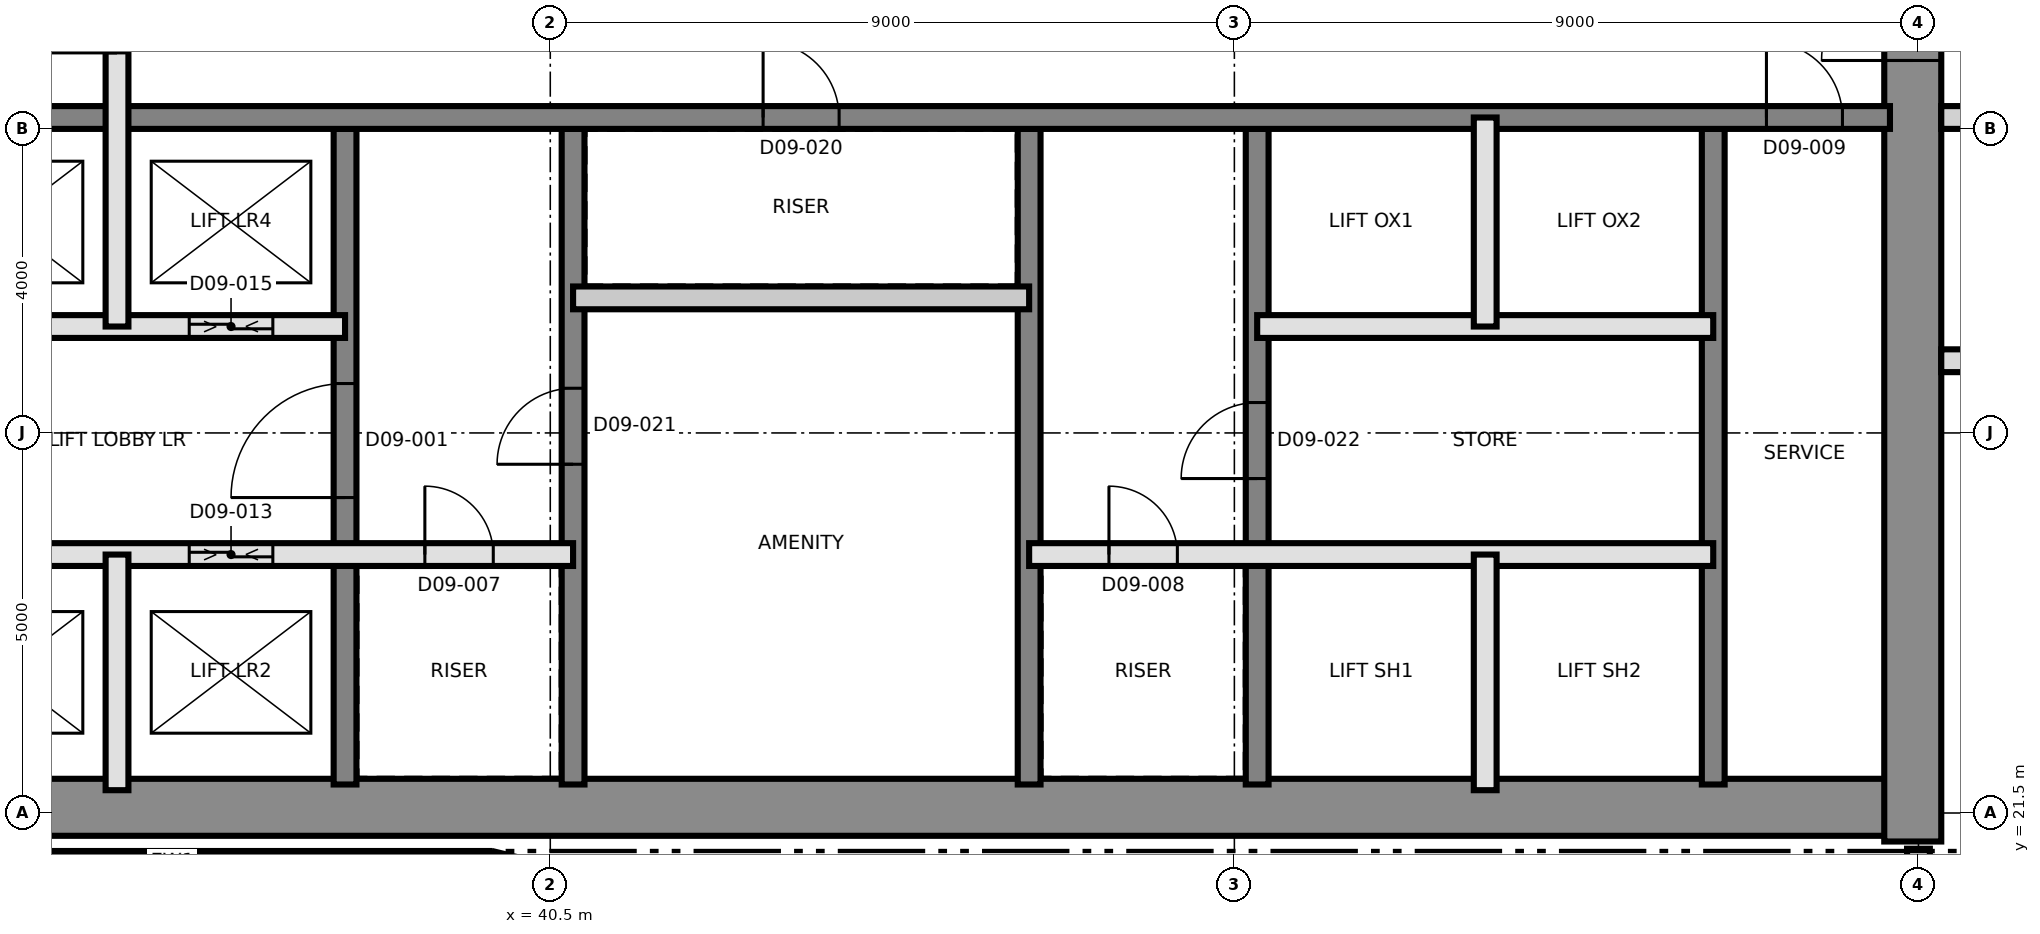
"""IFC4 building model, lengths in metres.
Left out: names, types, materials, properties, quantities, classifications, styles, units other than length and angle.
Written with IfcOpenShell. Run it as: python <this file> out.ifc"""

import sys

from ifc_helpers import new_model, si_unit, direction, frame, frame_2d, origin, place, context, subcontext, project, spatial, rectangle, extrude, element, fill, save


model = new_model("IFC4")
c1 = context("Model", 3, precision=1e-05, world=origin(), true_north=direction((0.0, 1.0)))
c2 = subcontext(c1, "Body", "Model", "MODEL_VIEW")
j1 = project(units=[si_unit("LENGTHUNIT", "METRE"), si_unit("PLANEANGLEUNIT", "RADIAN")], contexts=[c1])
p1 = place(None, origin())
s1 = spatial("IfcSite", under=j1, at=p1, CompositionType="ELEMENT")
p2 = place(p1, origin())
s2 = spatial("IfcBuilding", under=s1, at=p2, CompositionType="ELEMENT")
p3 = place(p2, frame((0.0, 0.0, 109.3)))
s3 = spatial("IfcBuildingStorey", under=s2, at=p3, CompositionType="ELEMENT", Elevation=109.3)
p4 = place(p3, frame((31.125, 21.575, 0.0), z_axis=(0.0, 0.0, 1.0), x_axis=(1.0, 0.0, 0.0)))
e1 = element("IfcWall", 1, at=p4, inside=s3, PredefinedType="SHEAR", context=c2, shape_type="SweptSolid", body=[
    extrude(rectangle(XDim=27.0, YDim=0.75, at=frame_2d((13.5, 0.0))), origin(), (0.0, 0.0, 1.0), 3.7),
])
p5 = place(p3, frame((58.425, 21.125, 0.0), z_axis=(0.0, 0.0, 1.0), x_axis=(0.0, 1.0, 0.0)))
e2 = element("IfcWall", 2, at=p5, inside=s3, PredefinedType="SHEAR", context=c2, shape_type="SweptSolid", body=[
    extrude(rectangle(XDim=18.75, YDim=0.75, at=frame_2d((9.375, 0.0))), origin(), (0.0, 0.0, 1.0), 3.7),
])
p6 = place(p5, frame((10.275, 0.0, 0.0)))
e3 = element("IfcOpeningElement", 3, at=p6, cuts=e2, PredefinedType="OPENING", context=c2, shape_type="SweptSolid", body=[
    extrude(rectangle(XDim=1.2, YDim=2.1, at=frame_2d((0.6, 1.05))), frame((0.0, 0.385, 0.0), z_axis=(0.0, -1.0, 0.0), x_axis=(1.0, 0.0, 0.0)), (0.0, 0.0, 1.0), 0.77),
])
p7 = place(p3, frame((37.8, 21.875, 0.0), z_axis=(0.0, 0.0, 1.0), x_axis=(0.0, 1.0, 0.0)))
e4 = element("IfcWall", 4, at=p7, inside=s3, PredefinedType="SHEAR", context=c2, shape_type="SweptSolid", body=[
    extrude(rectangle(XDim=8.625, YDim=0.3, at=frame_2d((4.312, 0.0))), origin(), (0.0, 0.0, 1.0), 3.7),
])
p8 = place(p7, frame((3.775, 0.0, 0.0)))
e5 = element("IfcOpeningElement", 5, at=p8, cuts=e4, PredefinedType="OPENING", context=c2, shape_type="SweptSolid", body=[
    extrude(rectangle(XDim=1.5, YDim=2.1, at=frame_2d((0.75, 1.05))), frame((0.0, 0.16, 0.0), z_axis=(0.0, -1.0, 0.0), x_axis=(1.0, 0.0, 0.0)), (0.0, 0.0, 1.0), 0.32),
])
p9 = place(p3, frame((40.8, 21.875, 0.0), z_axis=(0.0, 0.0, 1.0), x_axis=(0.0, 1.0, 0.0)))
e6 = element("IfcWall", 6, at=p9, inside=s3, PredefinedType="SHEAR", context=c2, shape_type="SweptSolid", body=[
    extrude(rectangle(XDim=8.625, YDim=0.3, at=frame_2d((4.312, 0.0))), origin(), (0.0, 0.0, 1.0), 3.7),
])
p10 = place(p9, frame((4.213, 0.0, 0.0)))
e7 = element("IfcOpeningElement", 7, at=p10, cuts=e6, PredefinedType="OPENING", context=c2, shape_type="SweptSolid", body=[
    extrude(rectangle(XDim=1.0, YDim=2.1, at=frame_2d((0.5, 1.05))), frame((0.0, 0.16, 0.0), z_axis=(0.0, -1.0, 0.0), x_axis=(1.0, 0.0, 0.0)), (0.0, 0.0, 1.0), 0.32),
])
p11 = place(p3, frame((46.8, 21.875, 0.0), z_axis=(0.0, 0.0, 1.0), x_axis=(0.0, 1.0, 0.0)))
e8 = element("IfcWall", 8, at=p11, inside=s3, PredefinedType="SHEAR", context=c2, shape_type="SweptSolid", body=[
    extrude(rectangle(XDim=8.625, YDim=0.3, at=frame_2d((4.312, 0.0))), origin(), (0.0, 0.0, 1.0), 3.7),
])
p12 = place(p3, frame((49.8, 21.875, 0.0), z_axis=(0.0, 0.0, 1.0), x_axis=(0.0, 1.0, 0.0)))
e9 = element("IfcWall", 9, at=p12, inside=s3, PredefinedType="SHEAR", context=c2, shape_type="SweptSolid", body=[
    extrude(rectangle(XDim=8.625, YDim=0.3, at=frame_2d((4.312, 0.0))), origin(), (0.0, 0.0, 1.0), 3.7),
])
p13 = place(p12, frame((4.025, 0.0, 0.0)))
e10 = element("IfcOpeningElement", 10, at=p13, cuts=e9, PredefinedType="OPENING", context=c2, shape_type="SweptSolid", body=[
    extrude(rectangle(XDim=1.0, YDim=2.1, at=frame_2d((0.5, 1.05))), frame((0.0, 0.16, 0.0), z_axis=(0.0, -1.0, 0.0), x_axis=(1.0, 0.0, 0.0)), (0.0, 0.0, 1.0), 0.32),
])
p14 = place(p3, frame((55.8, 21.875, 0.0), z_axis=(0.0, 0.0, 1.0), x_axis=(0.0, 1.0, 0.0)))
e11 = element("IfcWall", 11, at=p14, inside=s3, PredefinedType="SHEAR", context=c2, shape_type="SweptSolid", body=[
    extrude(rectangle(XDim=8.625, YDim=0.3, at=frame_2d((4.312, 0.0))), origin(), (0.0, 0.0, 1.0), 3.7),
])
p15 = place(p3, frame((31.875, 30.65, 0.0), z_axis=(0.0, 0.0, 1.0), x_axis=(1.0, 0.0, 0.0)))
e12 = element("IfcWall", 12, at=p15, inside=s3, PredefinedType="SHEAR", context=c2, shape_type="SweptSolid", body=[
    extrude(rectangle(XDim=26.25, YDim=0.3, at=frame_2d((13.125, 0.0))), origin(), (0.0, 0.0, 1.0), 3.7),
])
p16 = place(p15, frame((24.625, 0.0, 0.0)))
e13 = element("IfcOpeningElement", 13, at=p16, cuts=e12, PredefinedType="OPENING", context=c2, shape_type="SweptSolid", body=[
    extrude(rectangle(XDim=1.0, YDim=2.1, at=frame_2d((0.5, 1.05))), frame((0.0, 0.16, 0.0), z_axis=(0.0, -1.0, 0.0), x_axis=(1.0, 0.0, 0.0)), (0.0, 0.0, 1.0), 0.32),
])
p17 = place(p15, frame((11.425, 0.0, 0.0)))
e14 = element("IfcOpeningElement", 14, at=p17, cuts=e12, PredefinedType="OPENING", context=c2, shape_type="SweptSolid", body=[
    extrude(rectangle(XDim=1.0, YDim=2.1, at=frame_2d((0.5, 1.05))), frame((0.0, 0.16, 0.0), z_axis=(0.0, -1.0, 0.0), x_axis=(1.0, 0.0, 0.0)), (0.0, 0.0, 1.0), 0.32),
])
p18 = place(p3, frame((31.36, 20.85, 0.0), z_axis=(0.0, 0.0, 1.0), x_axis=(1.0, 0.0, 0.0)))
e15 = element("IfcWall", 15, at=p18, inside=s3, PredefinedType="SOLIDWALL", context=c2, shape_type="SweptSolid", body=[
    extrude(rectangle(XDim=8.34, YDim=0.3, at=frame_2d((4.17, 0.0))), origin(), (0.0, 0.0, 1.0), 3.4),
])
p19 = place(p3, frame((39.735, 20.846, 0.0), z_axis=(0.0, 0.0, 1.0), x_axis=(0.97206095595, -0.234728562212, 0.0)))
e16 = element("IfcWall", 16, at=p19, inside=s3, PredefinedType="SOLIDWALL", context=c2, shape_type="SweptSolid", body=[
    extrude(rectangle(XDim=2.35, YDim=0.3, at=frame_2d((1.175, 0.0))), origin(), (0.0, 0.0, 1.0), 3.4),
])
p20 = place(p3, frame((31.8, 24.9, 0.0), z_axis=(0.0, 0.0, 1.0), x_axis=(1.0, 0.0, 0.0)))
e17 = element("IfcWall", 17, at=p20, inside=s3, PredefinedType="SOLIDWALL", context=c2, shape_type="SweptSolid", body=[
    extrude(rectangle(XDim=9.0, YDim=0.3, at=frame_2d((4.5, 0.0))), origin(), (0.0, 0.0, 1.0), 3.4),
])
p21 = place(p20, frame((7.05, 0.0, 0.0)))
e18 = element("IfcOpeningElement", 18, at=p21, cuts=e17, PredefinedType="OPENING", context=c2, shape_type="SweptSolid", body=[
    extrude(rectangle(XDim=0.9, YDim=2.1, at=frame_2d((0.45, 1.05))), frame((0.0, 0.16, 0.0), z_axis=(0.0, -1.0, 0.0), x_axis=(1.0, 0.0, 0.0)), (0.0, 0.0, 1.0), 0.32),
])
p22 = place(p20, frame((0.95, 0.0, 0.0)))
e19 = element("IfcOpeningElement", 19, at=p22, cuts=e17, PredefinedType="OPENING", context=c2, shape_type="SweptSolid", body=[
    extrude(rectangle(XDim=1.1, YDim=2.4, at=frame_2d((0.55, 1.2))), frame((0.0, 0.16, 0.0), z_axis=(0.0, -1.0, 0.0), x_axis=(1.0, 0.0, 0.0)), (0.0, 0.0, 1.0), 0.32),
])
p23 = place(p20, frame((3.95, 0.0, 0.0)))
e20 = element("IfcOpeningElement", 20, at=p23, cuts=e17, PredefinedType="OPENING", context=c2, shape_type="SweptSolid", body=[
    extrude(rectangle(XDim=1.1, YDim=2.4, at=frame_2d((0.55, 1.2))), frame((0.0, 0.16, 0.0), z_axis=(0.0, -1.0, 0.0), x_axis=(1.0, 0.0, 0.0)), (0.0, 0.0, 1.0), 0.32),
])
p24 = place(p3, frame((46.8, 24.9, 0.0), z_axis=(0.0, 0.0, 1.0), x_axis=(1.0, 0.0, 0.0)))
e21 = element("IfcWall", 21, at=p24, inside=s3, PredefinedType="SOLIDWALL", context=c2, shape_type="SweptSolid", body=[
    extrude(rectangle(XDim=9.0, YDim=0.3, at=frame_2d((4.5, 0.0))), origin(), (0.0, 0.0, 1.0), 3.4),
])
p25 = place(p24, frame((1.05, 0.0, 0.0)))
e22 = element("IfcOpeningElement", 22, at=p25, cuts=e21, PredefinedType="OPENING", context=c2, shape_type="SweptSolid", body=[
    extrude(rectangle(XDim=0.9, YDim=2.1, at=frame_2d((0.45, 1.05))), frame((0.0, 0.16, 0.0), z_axis=(0.0, -1.0, 0.0), x_axis=(1.0, 0.0, 0.0)), (0.0, 0.0, 1.0), 0.32),
])
p26 = place(p3, frame((31.8, 27.9, 0.0), z_axis=(0.0, 0.0, 1.0), x_axis=(1.0, 0.0, 0.0)))
e23 = element("IfcWall", 23, at=p26, inside=s3, PredefinedType="SOLIDWALL", context=c2, shape_type="SweptSolid", body=[
    extrude(rectangle(XDim=6.0, YDim=0.3, at=frame_2d((3.0, 0.0))), origin(), (0.0, 0.0, 1.0), 3.4),
])
p27 = place(p26, frame((0.95, 0.0, 0.0)))
e24 = element("IfcOpeningElement", 24, at=p27, cuts=e23, PredefinedType="OPENING", context=c2, shape_type="SweptSolid", body=[
    extrude(rectangle(XDim=1.1, YDim=2.4, at=frame_2d((0.55, 1.2))), frame((0.0, 0.16, 0.0), z_axis=(0.0, -1.0, 0.0), x_axis=(1.0, 0.0, 0.0)), (0.0, 0.0, 1.0), 0.32),
])
p28 = place(p26, frame((3.95, 0.0, 0.0)))
e25 = element("IfcOpeningElement", 25, at=p28, cuts=e23, PredefinedType="OPENING", context=c2, shape_type="SweptSolid", body=[
    extrude(rectangle(XDim=1.1, YDim=2.4, at=frame_2d((0.55, 1.2))), frame((0.0, 0.16, 0.0), z_axis=(0.0, -1.0, 0.0), x_axis=(1.0, 0.0, 0.0)), (0.0, 0.0, 1.0), 0.32),
])
p29 = place(p3, frame((49.8, 27.9, 0.0), z_axis=(0.0, 0.0, 1.0), x_axis=(1.0, 0.0, 0.0)))
e26 = element("IfcWall", 26, at=p29, inside=s3, PredefinedType="SOLIDWALL", context=c2, shape_type="SweptSolid", body=[
    extrude(rectangle(XDim=6.0, YDim=0.3, at=frame_2d((3.0, 0.0))), origin(), (0.0, 0.0, 1.0), 3.4),
])
p30 = place(p3, frame((40.8, 28.277, 0.0), z_axis=(0.0, 0.0, 1.0), x_axis=(1.0, 0.0, 0.0)))
e27 = element("IfcWall", 27, at=p30, inside=s3, PredefinedType="PARTITIONING", context=c2, shape_type="SweptSolid", body=[
    extrude(rectangle(XDim=6.0, YDim=0.3, at=frame_2d((3.0, 0.0))), origin(), (0.0, 0.0, 1.0), 3.4),
])
p31 = place(p3, frame((34.8, 21.8, 0.0), z_axis=(0.0, 0.0, 1.0), x_axis=(0.0, 1.0, 0.0)))
e28 = element("IfcWall", 28, at=p31, inside=s3, PredefinedType="SOLIDWALL", context=c2, shape_type="SweptSolid", body=[
    extrude(rectangle(XDim=3.1, YDim=0.3, at=frame_2d((1.55, 0.0))), origin(), (0.0, 0.0, 1.0), 3.4),
])
p32 = place(p3, frame((34.8, 27.9, 0.0), z_axis=(0.0, 0.0, 1.0), x_axis=(0.0, 1.0, 0.0)))
e29 = element("IfcWall", 29, at=p32, inside=s3, PredefinedType="SOLIDWALL", context=c2, shape_type="SweptSolid", body=[
    extrude(rectangle(XDim=5.45, YDim=0.3, at=frame_2d((2.725, 0.0))), origin(), (0.0, 0.0, 1.0), 3.4),
])
p33 = place(p32, frame((3.6, 0.0, 0.0)))
e30 = element("IfcOpeningElement", 30, at=p33, cuts=e29, PredefinedType="OPENING", context=c2, shape_type="SweptSolid", body=[
    extrude(rectangle(XDim=1.0, YDim=2.1, at=frame_2d((0.5, 1.05))), frame((0.0, 0.16, 0.0), z_axis=(0.0, -1.0, 0.0), x_axis=(1.0, 0.0, 0.0)), (0.0, 0.0, 1.0), 0.32),
])
p34 = place(p3, frame((52.8, 21.8, 0.0), z_axis=(0.0, 0.0, 1.0), x_axis=(0.0, 1.0, 0.0)))
e31 = element("IfcWall", 31, at=p34, inside=s3, PredefinedType="SOLIDWALL", context=c2, shape_type="SweptSolid", body=[
    extrude(rectangle(XDim=3.1, YDim=0.3, at=frame_2d((1.55, 0.0))), origin(), (0.0, 0.0, 1.0), 3.4),
])
p35 = place(p3, frame((52.8, 27.9, 0.0), z_axis=(0.0, 0.0, 1.0), x_axis=(0.0, 1.0, 0.0)))
e32 = element("IfcWall", 32, at=p35, inside=s3, PredefinedType="SOLIDWALL", context=c2, shape_type="SweptSolid", body=[
    extrude(rectangle(XDim=2.75, YDim=0.3, at=frame_2d((1.375, 0.0))), origin(), (0.0, 0.0, 1.0), 3.4),
])
p36 = place(p3, frame((58.8, 27.45, 0.0), z_axis=(0.0, 0.0, 1.0), x_axis=(1.0, 0.0, 0.0)))
e33 = element("IfcWall", 33, at=p36, inside=s3, PredefinedType="PARTITIONING", context=c2, shape_type="SweptSolid", body=[
    extrude(rectangle(XDim=2.4, YDim=0.3, at=frame_2d((1.2, 0.0))), origin(), (0.0, 0.0, 1.0), 3.4),
])
p37 = place(p36, frame((0.65, 0.0, 0.0)))
e34 = element("IfcOpeningElement", 34, at=p37, cuts=e33, PredefinedType="OPENING", context=c2, shape_type="SweptSolid", body=[
    extrude(rectangle(XDim=0.8, YDim=2.1, at=frame_2d((0.4, 1.05))), frame((0.0, 0.16, 0.0), z_axis=(0.0, -1.0, 0.0), x_axis=(1.0, 0.0, 0.0)), (0.0, 0.0, 1.0), 0.32),
])
p38 = place(p3, frame((58.8, 30.65, 0.0), z_axis=(0.0, 0.0, 1.0), x_axis=(1.0, 0.0, 0.0)))
e35 = element("IfcWall", 35, at=p38, inside=s3, PredefinedType="PARTITIONING", context=c2, shape_type="SweptSolid", body=[
    extrude(rectangle(XDim=26.53, YDim=0.3, at=frame_2d((13.265, 0.0))), origin(), (0.0, 0.0, 1.0), 3.4),
])
p39 = place(p38, frame((3.115, 0.0, 0.0)))
e36 = element("IfcOpeningElement", 36, at=p39, cuts=e35, PredefinedType="OPENING", context=c2, shape_type="SweptSolid", body=[
    extrude(rectangle(XDim=1.0, YDim=2.1, at=frame_2d((0.5, 1.05))), frame((0.0, 0.16, 0.0), z_axis=(0.0, -1.0, 0.0), x_axis=(1.0, 0.0, 0.0)), (0.0, 0.0, 1.0), 0.32),
])
p40 = place(p38, frame((6.065, 0.0, 0.0)))
e37 = element("IfcOpeningElement", 37, at=p40, cuts=e35, PredefinedType="OPENING", context=c2, shape_type="SweptSolid", body=[
    extrude(rectangle(XDim=1.4, YDim=2.1, at=frame_2d((0.7, 1.05))), frame((0.0, 0.16, 0.0), z_axis=(0.0, -1.0, 0.0), x_axis=(1.0, 0.0, 0.0)), (0.0, 0.0, 1.0), 0.32),
])
p41 = place(p38, frame((9.835, 0.0, 0.0)))
e38 = element("IfcOpeningElement", 38, at=p41, cuts=e35, PredefinedType="OPENING", context=c2, shape_type="SweptSolid", body=[
    extrude(rectangle(XDim=1.2, YDim=2.1, at=frame_2d((0.6, 1.05))), frame((0.0, 0.16, 0.0), z_axis=(0.0, -1.0, 0.0), x_axis=(1.0, 0.0, 0.0)), (0.0, 0.0, 1.0), 0.32),
])
p42 = place(p38, frame((13.085, 0.0, 0.0)))
e39 = element("IfcOpeningElement", 39, at=p42, cuts=e35, PredefinedType="OPENING", context=c2, shape_type="SweptSolid", body=[
    extrude(rectangle(XDim=1.0, YDim=2.1, at=frame_2d((0.5, 1.05))), frame((0.0, 0.16, 0.0), z_axis=(0.0, -1.0, 0.0), x_axis=(1.0, 0.0, 0.0)), (0.0, 0.0, 1.0), 0.32),
])
p43 = place(p38, frame((21.7, 0.0, 0.0)))
e40 = element("IfcOpeningElement", 40, at=p43, cuts=e35, PredefinedType="OPENING", context=c2, shape_type="SweptSolid", body=[
    extrude(rectangle(XDim=1.0, YDim=2.4, at=frame_2d((0.5, 1.2))), frame((0.0, 0.16, 0.0), z_axis=(0.0, -1.0, 0.0), x_axis=(1.0, 0.0, 0.0)), (0.0, 0.0, 1.0), 0.32),
])
p44 = place(p3, frame((58.5, 20.35, 0.0), z_axis=(0.0, 0.0, 1.0), x_axis=(0.0, 1.0, 0.0)))
e41 = element("IfcWall", 41, at=p44, inside=s3, PredefinedType="PARTITIONING", context=c2, shape_type="SweptSolid", body=[
    extrude(rectangle(XDim=0.68, YDim=0.3, at=frame_2d((0.34, 0.0))), origin(), (0.0, 0.0, 1.0), 3.4),
])
p45 = place(p8, origin())
e42 = element("IfcDoor", 42, at=p45, inside=s3, OperationType="SINGLE_SWING_LEFT", PredefinedType="DOOR", context=c2, shape_type="SweptSolid", body=[
    extrude(rectangle(XDim=1.5, YDim=2.1, at=frame_2d((0.75, 1.05))), frame((0.0, 0.025, 0.0), z_axis=(0.0, -1.0, 0.0), x_axis=(1.0, 0.0, 0.0)), (0.0, 0.0, 1.0), 0.05),
])
fill(e5, e42)
p46 = place(p21, origin())
e43 = element("IfcDoor", 43, at=p46, inside=s3, OperationType="SINGLE_SWING_LEFT", PredefinedType="DOOR", context=c2, shape_type="SweptSolid", body=[
    extrude(rectangle(XDim=0.9, YDim=2.1, at=frame_2d((0.45, 1.05))), frame((0.0, 0.025, 0.0), z_axis=(0.0, -1.0, 0.0), x_axis=(1.0, 0.0, 0.0)), (0.0, 0.0, 1.0), 0.05),
])
fill(e18, e43)
p47 = place(p25, origin())
e44 = element("IfcDoor", 44, at=p47, inside=s3, OperationType="SINGLE_SWING_RIGHT", PredefinedType="DOOR", context=c2, shape_type="SweptSolid", body=[
    extrude(rectangle(XDim=0.9, YDim=2.1, at=frame_2d((0.45, 1.05))), frame((0.0, 0.025, 0.0), z_axis=(0.0, -1.0, 0.0), x_axis=(1.0, 0.0, 0.0)), (0.0, 0.0, 1.0), 0.05),
])
fill(e22, e44)
p48 = place(p16, origin())
e45 = element("IfcDoor", 45, at=p48, inside=s3, OperationType="SINGLE_SWING_LEFT", PredefinedType="DOOR", context=c2, shape_type="SweptSolid", body=[
    extrude(rectangle(XDim=1.0, YDim=2.1, at=frame_2d((0.5, 1.05))), frame((0.0, 0.025, 0.0), z_axis=(0.0, -1.0, 0.0), x_axis=(1.0, 0.0, 0.0)), (0.0, 0.0, 1.0), 0.05),
])
fill(e13, e45)
p49 = place(p6, origin())
e46 = element("IfcDoor", 46, at=p49, inside=s3, OperationType="SINGLE_SWING_LEFT", PredefinedType="DOOR", context=c2, shape_type="SweptSolid", body=[
    extrude(rectangle(XDim=1.2, YDim=2.1, at=frame_2d((0.6, 1.05))), frame((0.0, 0.025, 0.0), z_axis=(0.0, -1.0, 0.0), x_axis=(1.0, 0.0, 0.0)), (0.0, 0.0, 1.0), 0.05),
])
fill(e3, e46)
p50 = place(p23, origin())
e47 = element("IfcDoor", 47, at=p50, inside=s3, OperationType="SLIDING_TO_LEFT", PredefinedType="DOOR", context=c2, shape_type="SweptSolid", body=[
    extrude(rectangle(XDim=1.1, YDim=2.4, at=frame_2d((0.55, 1.2))), frame((0.0, 0.025, 0.0), z_axis=(0.0, -1.0, 0.0), x_axis=(1.0, 0.0, 0.0)), (0.0, 0.0, 1.0), 0.05),
])
fill(e20, e47)
p51 = place(p28, origin())
e48 = element("IfcDoor", 48, at=p51, inside=s3, OperationType="SLIDING_TO_LEFT", PredefinedType="DOOR", context=c2, shape_type="SweptSolid", body=[
    extrude(rectangle(XDim=1.1, YDim=2.4, at=frame_2d((0.55, 1.2))), frame((0.0, 0.025, 0.0), z_axis=(0.0, -1.0, 0.0), x_axis=(1.0, 0.0, 0.0)), (0.0, 0.0, 1.0), 0.05),
])
fill(e25, e48)
p52 = place(p17, origin())
e49 = element("IfcDoor", 49, at=p52, inside=s3, OperationType="SINGLE_SWING_LEFT", PredefinedType="DOOR", context=c2, shape_type="SweptSolid", body=[
    extrude(rectangle(XDim=1.0, YDim=2.1, at=frame_2d((0.5, 1.05))), frame((0.0, 0.025, 0.0), z_axis=(0.0, -1.0, 0.0), x_axis=(1.0, 0.0, 0.0)), (0.0, 0.0, 1.0), 0.05),
])
fill(e14, e49)
p53 = place(p10, origin())
e50 = element("IfcDoor", 50, at=p53, inside=s3, OperationType="SINGLE_SWING_RIGHT", PredefinedType="DOOR", context=c2, shape_type="SweptSolid", body=[
    extrude(rectangle(XDim=1.0, YDim=2.1, at=frame_2d((0.5, 1.05))), frame((0.0, 0.025, 0.0), z_axis=(0.0, -1.0, 0.0), x_axis=(1.0, 0.0, 0.0)), (0.0, 0.0, 1.0), 0.05),
])
fill(e7, e50)
p54 = place(p13, origin())
e51 = element("IfcDoor", 51, at=p54, inside=s3, OperationType="SINGLE_SWING_LEFT", PredefinedType="DOOR", context=c2, shape_type="SweptSolid", body=[
    extrude(rectangle(XDim=1.0, YDim=2.1, at=frame_2d((0.5, 1.05))), frame((0.0, 0.025, 0.0), z_axis=(0.0, -1.0, 0.0), x_axis=(1.0, 0.0, 0.0)), (0.0, 0.0, 1.0), 0.05),
])
fill(e10, e51)
save(model, sys.argv[1])
